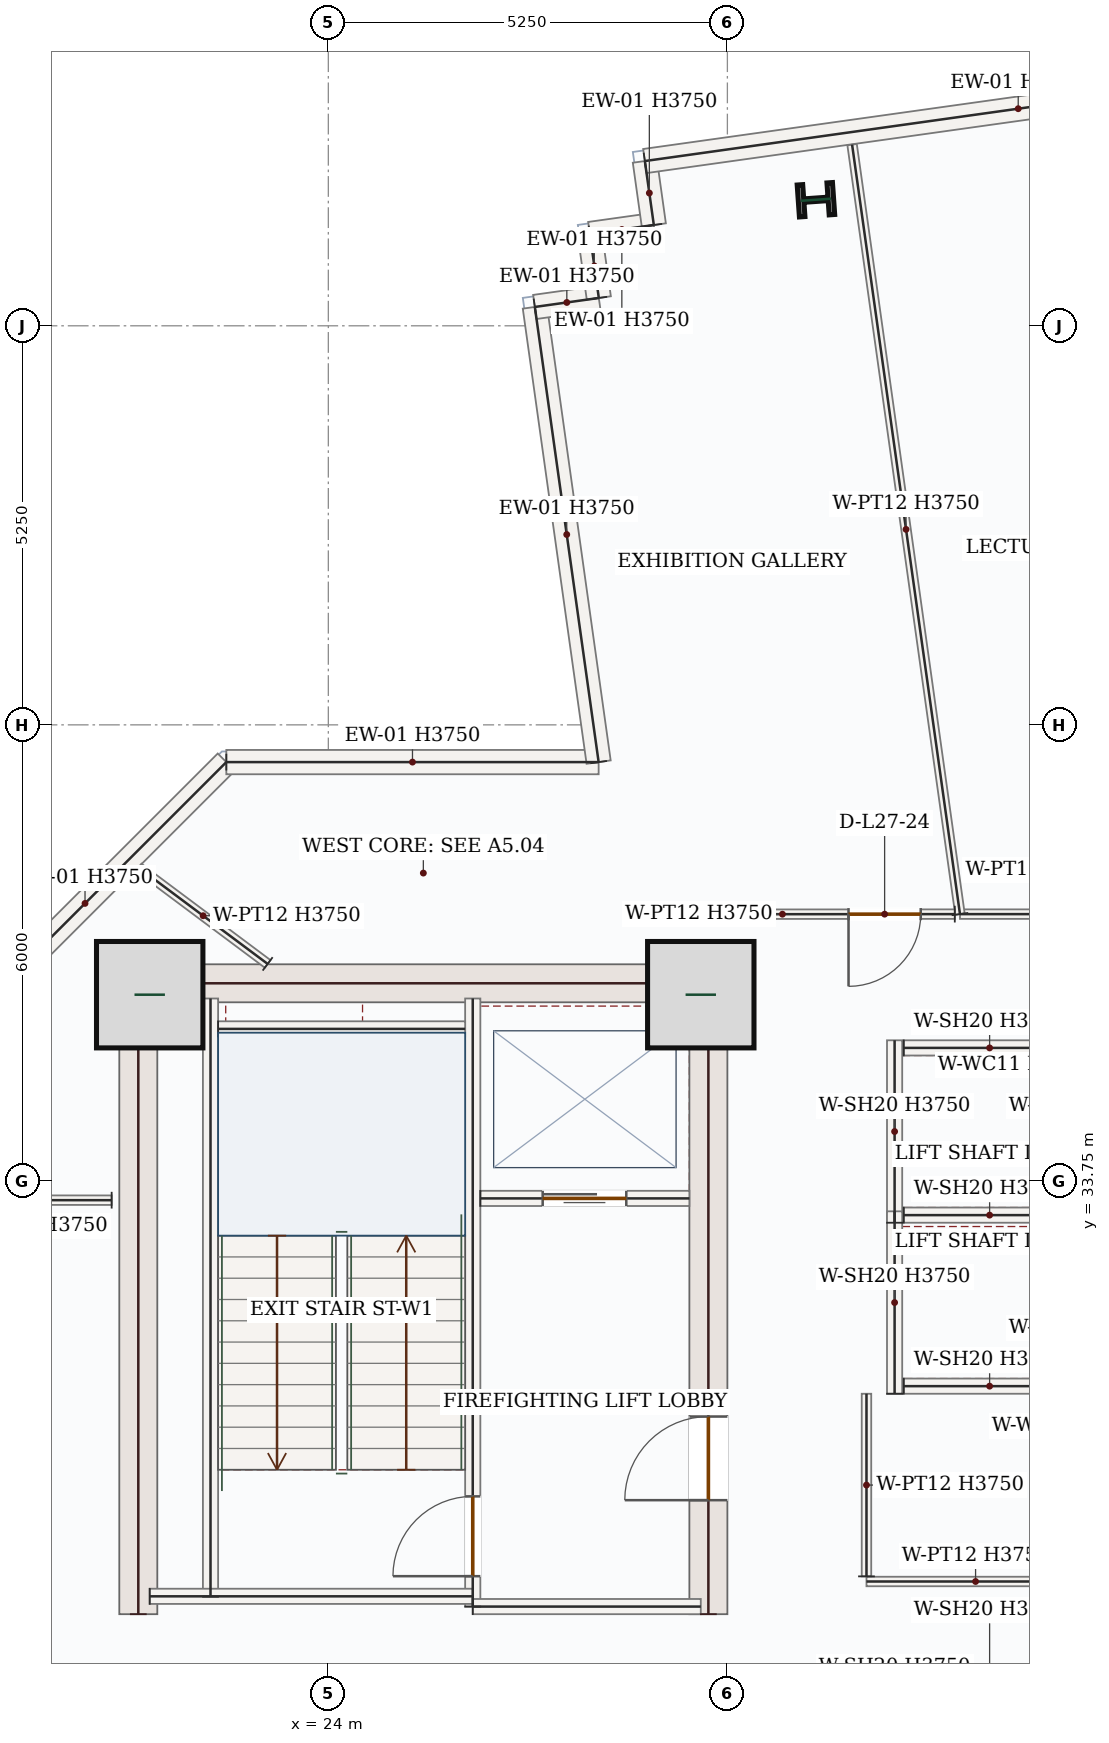
"""IFC4 building model, lengths in metres.
Left out: names, types, materials, properties, quantities, classifications, styles, units other than length and angle.
Written with IfcOpenShell. Run it as: python <this file> out.ifc"""

import sys

from ifc_helpers import new_model, si_unit, direction, frame, frame_2d, origin, origin_2d, place, context, subcontext, project, spatial, rectangle, i_section, extrude, source, transform, mapped, element, fill, save


model = new_model("IFC4")
c1 = context("Model", 3, precision=1e-05, world=origin(), true_north=direction((0.0, 1.0)))
c2 = subcontext(c1, "Body", "Model", "MODEL_VIEW")
j1 = project(units=[si_unit("LENGTHUNIT", "METRE"), si_unit("PLANEANGLEUNIT", "RADIAN")], contexts=[c1])
p1 = place(None, origin())
s1 = spatial("IfcSite", under=j1, at=p1, CompositionType="ELEMENT")
p2 = place(p1, origin())
s2 = spatial("IfcBuilding", under=s1, at=p2, CompositionType="ELEMENT")
p3 = place(p2, frame((0.0, 0.0, 121.5)))
s3 = spatial("IfcBuildingStorey", under=s2, at=p3, CompositionType="ELEMENT", Elevation=121.5)
m1 = source(origin(), c2, "Body", "SweptSolid", [
    extrude(rectangle(XDim=8.55, YDim=0.5, at=frame_2d((4.275, 0.0))), origin(), (0.0, 0.0, 1.0), 3.75),
])
p4 = place(p3, frame((21.5, 28.05, 0.0), z_axis=(0.0, 0.0, 1.0), x_axis=(0.0, 1.0, 0.0)))
e1 = element("IfcWall", 1, at=p4, inside=s3, PredefinedType="SHEAR", context=c2, shape_type="MappedRepresentation", body=[
    mapped(m1, transform((0.0, 0.0, 0.0), x_axis=(1.0, 0.0, 0.0), y_axis=(0.0, 1.0, 0.0), z_axis=(0.0, 0.0, 1.0), scale=1.0)),
])
p5 = place(p3, frame((29.0, 28.05, 0.0), z_axis=(0.0, 0.0, 1.0), x_axis=(0.0, 1.0, 0.0)))
e2 = element("IfcWall", 2, at=p5, inside=s3, PredefinedType="SHEAR", context=c2, shape_type="SweptSolid", body=[
    extrude(rectangle(XDim=8.55, YDim=0.5, at=frame_2d((4.275, 0.0))), origin(), (0.0, 0.0, 1.0), 3.75),
])
p6 = place(p5, frame((1.5, 0.0, 0.0)))
e3 = element("IfcOpeningElement", 3, at=p6, cuts=e2, PredefinedType="OPENING", context=c2, shape_type="SweptSolid", body=[
    extrude(rectangle(XDim=1.1, YDim=2.2, at=frame_2d((0.55, 1.1))), frame((0.0, 0.26, 0.0), z_axis=(0.0, -1.0, 0.0), x_axis=(1.0, 0.0, 0.0)), (0.0, 0.0, 1.0), 0.52),
])
m2 = source(origin(), c2, "Body", "SweptSolid", [
    extrude(rectangle(XDim=7.0, YDim=0.5, at=frame_2d((3.5, 0.0))), origin(), (0.0, 0.0, 1.0), 3.75),
])
p7 = place(p3, frame((21.75, 36.35, 0.0), z_axis=(0.0, 0.0, 1.0), x_axis=(1.0, 0.0, 0.0)))
e4 = element("IfcWall", 4, at=p7, inside=s3, PredefinedType="SHEAR", context=c2, shape_type="MappedRepresentation", body=[
    mapped(m2, transform((0.0, 0.0, 0.0), x_axis=(1.0, 0.0, 0.0), y_axis=(0.0, 1.0, 0.0), z_axis=(0.0, 0.0, 1.0), scale=1.0)),
])
m3 = source(origin(), c2, "Body", "SweptSolid", [
    extrude(rectangle(XDim=1.4, YDim=1.4, at=origin_2d()), origin(), (0.0, 0.0, 1.0), 4.2),
])
for number, where, z_axis, x_axis in (
    (5, (21.65, 36.2, 0.0), (0.0, 0.0, 1.0), (1.0, 0.0, 0.0)),
    (6, (28.9, 36.2, 0.0), (0.0, 0.0, 1.0), (1.0, 0.0, 0.0)),
):
    element("IfcColumn", number, at=place(p3, frame(where, z_axis=z_axis, x_axis=x_axis)), inside=s3, PredefinedType="COLUMN", context=c2, shape_type="MappedRepresentation", body=[
        mapped(m3, transform((0.0, 0.0, 0.0), x_axis=(1.0, 0.0, 0.0), y_axis=(0.0, 1.0, 0.0), z_axis=(0.0, 0.0, 1.0), scale=1.0)),
    ])
m4 = source(origin(), c2, "Body", "SweptSolid", [
    extrude(i_section(OverallWidth=0.421, OverallDepth=0.465, WebThickness=0.045, FlangeThickness=0.073, FilletRadius=0.018, at=origin_2d()), origin(), (0.0, 0.0, 1.0), 4.2),
])
p8 = place(p3, frame((30.415, 46.658, 0.0), z_axis=(0.0, 0.0, 1.0), x_axis=(-0.069756473744, 0.99756405026, 0.0)))
e7 = element("IfcColumn", 7, at=p8, inside=s3, PredefinedType="COLUMN", context=c2, shape_type="MappedRepresentation", body=[
    mapped(m4, transform((0.0, 0.0, 0.0), x_axis=(1.0, 0.0, 0.0), y_axis=(0.0, 1.0, 0.0), z_axis=(0.0, 0.0, 1.0), scale=1.0)),
])
m5 = source(origin(), c2, "Body", "SweptSolid", [
    extrude(rectangle(XDim=5.258, YDim=0.32, at=frame_2d((2.629, 0.0))), origin(), (0.0, 0.0, 1.0), 3.75),
])
p9 = place(p3, frame((18.94, 35.542, 0.0), z_axis=(0.0, 0.0, 1.0), x_axis=(0.707106781187, 0.707106781187, 0.0)))
e8 = element("IfcWall", 8, at=p9, inside=s3, PredefinedType="SOLIDWALL", context=c2, shape_type="MappedRepresentation", body=[
    mapped(m5, transform((0.0, 0.0, 0.0), x_axis=(1.0, 0.0, 0.0), y_axis=(0.0, 1.0, 0.0), z_axis=(0.0, 0.0, 1.0), scale=1.0)),
])
m6 = source(origin(), c2, "Body", "SweptSolid", [
    extrude(rectangle(XDim=4.898, YDim=0.32, at=frame_2d((2.449, 0.0))), origin(), (0.0, 0.0, 1.0), 3.75),
])
p10 = place(p3, frame((22.658, 39.26, 0.0), z_axis=(0.0, 0.0, 1.0), x_axis=(1.0, 0.0, 0.0)))
e9 = element("IfcWall", 9, at=p10, inside=s3, PredefinedType="SOLIDWALL", context=c2, shape_type="MappedRepresentation", body=[
    mapped(m6, transform((0.0, 0.0, 0.0), x_axis=(1.0, 0.0, 0.0), y_axis=(0.0, 1.0, 0.0), z_axis=(0.0, 0.0, 1.0), scale=1.0)),
])
m7 = source(origin(), c2, "Body", "SweptSolid", [
    extrude(rectangle(XDim=6.046, YDim=0.32, at=frame_2d((3.023, 0.0))), origin(), (0.0, 0.0, 1.0), 3.75),
])
p11 = place(p3, frame((27.556, 39.26, 0.0), z_axis=(0.0, 0.0, 1.0), x_axis=(-0.138820507469, 0.990317558517, 0.0)))
e10 = element("IfcWall", 10, at=p11, inside=s3, PredefinedType="SOLIDWALL", context=c2, shape_type="MappedRepresentation", body=[
    mapped(m7, transform((0.0, 0.0, 0.0), x_axis=(1.0, 0.0, 0.0), y_axis=(0.0, 1.0, 0.0), z_axis=(0.0, 0.0, 1.0), scale=1.0)),
])
m8 = source(origin(), c2, "Body", "SweptSolid", [
    extrude(rectangle(XDim=0.85, YDim=0.32, at=frame_2d((0.425, 0.0))), origin(), (0.0, 0.0, 1.0), 3.75),
])
for number, where, z_axis, x_axis in (
    (11, (26.717, 45.248, 0.0), (0.0, 0.0, 1.0), (0.99, 0.139, 0.0)),
    (12, (27.559, 45.366, 0.0), (0.0, 0.0, 1.0), (-0.139, 0.99, 0.0)),
):
    element("IfcWall", number, at=place(p3, frame(where, z_axis=z_axis, x_axis=x_axis)), inside=s3, PredefinedType="SOLIDWALL", context=c2, shape_type="MappedRepresentation", body=[
        mapped(m8, transform((0.0, 0.0, 0.0), x_axis=(1.0, 0.0, 0.0), y_axis=(0.0, 1.0, 0.0), z_axis=(0.0, 0.0, 1.0), scale=1.0)),
    ])
m9 = source(origin(), c2, "Body", "SweptSolid", [
    extrude(rectangle(XDim=0.85, YDim=0.32, at=frame_2d((0.425, 0.0))), origin(), (0.0, 0.0, 1.0), 3.75),
])
p12 = place(p3, frame((27.441, 46.208, 0.0), z_axis=(0.0, 0.0, 1.0), x_axis=(0.990325171071, 0.138766190202, 0.0)))
e13 = element("IfcWall", 13, at=p12, inside=s3, PredefinedType="SOLIDWALL", context=c2, shape_type="MappedRepresentation", body=[
    mapped(m9, transform((0.0, 0.0, 0.0), x_axis=(1.0, 0.0, 0.0), y_axis=(0.0, 1.0, 0.0), z_axis=(0.0, 0.0, 1.0), scale=1.0)),
])
p13 = place(p3, frame((28.282, 46.326, 0.0), z_axis=(0.0, 0.0, 1.0), x_axis=(-0.138726719425, 0.990330700987, 0.0)))
e14 = element("IfcWall", 14, at=p13, inside=s3, PredefinedType="SOLIDWALL", context=c2, shape_type="MappedRepresentation", body=[
    mapped(m8, transform((0.0, 0.0, 0.0), x_axis=(1.0, 0.0, 0.0), y_axis=(0.0, 1.0, 0.0), z_axis=(0.0, 0.0, 1.0), scale=1.0)),
])
m10 = source(origin(), c2, "Body", "SweptSolid", [
    extrude(rectangle(XDim=9.92, YDim=0.32, at=frame_2d((4.96, 0.0))), origin(), (0.0, 0.0, 1.0), 3.75),
])
p14 = place(p3, frame((28.164, 47.167, 0.0), z_axis=(0.0, 0.0, 1.0), x_axis=(0.990316250135, 0.138829840876, 0.0)))
e15 = element("IfcWall", 15, at=p14, inside=s3, PredefinedType="SOLIDWALL", context=c2, shape_type="MappedRepresentation", body=[
    mapped(m10, transform((0.0, 0.0, 0.0), x_axis=(1.0, 0.0, 0.0), y_axis=(0.0, 1.0, 0.0), z_axis=(0.0, 0.0, 1.0), scale=1.0)),
])
m11 = source(origin(), c2, "Body", "SweptSolid", [
    extrude(rectangle(XDim=7.87, YDim=0.2, at=frame_2d((3.935, 0.0))), origin(), (0.0, 0.0, 1.0), 3.75),
])
p15 = place(p3, frame((22.45, 28.28, 0.0), z_axis=(0.0, 0.0, 1.0), x_axis=(0.0, 1.0, 0.0)))
e16 = element("IfcWall", 16, at=p15, inside=s3, PredefinedType="SOLIDWALL", context=c2, shape_type="MappedRepresentation", body=[
    mapped(m11, transform((0.0, 0.0, 0.0), x_axis=(1.0, 0.0, 0.0), y_axis=(0.0, 1.0, 0.0), z_axis=(0.0, 0.0, 1.0), scale=1.0)),
])
p16 = place(p3, frame((25.9, 28.15, 0.0), z_axis=(0.0, 0.0, 1.0), x_axis=(0.0, 1.0, 0.0)))
e17 = element("IfcWall", 17, at=p16, inside=s3, PredefinedType="SOLIDWALL", context=c2, shape_type="SweptSolid", body=[
    extrude(rectangle(XDim=8.0, YDim=0.2, at=frame_2d((4.0, 0.0))), origin(), (0.0, 0.0, 1.0), 3.75),
])
p17 = place(p16, frame((0.4, 0.0, 0.0)))
e18 = element("IfcOpeningElement", 18, at=p17, cuts=e17, PredefinedType="OPENING", context=c2, shape_type="SweptSolid", body=[
    extrude(rectangle(XDim=1.05, YDim=2.15, at=frame_2d((0.525, 1.075))), frame((0.0, 0.11, 0.0), z_axis=(0.0, -1.0, 0.0), x_axis=(1.0, 0.0, 0.0)), (0.0, 0.0, 1.0), 0.22),
])
m12 = source(origin(), c2, "Body", "SweptSolid", [
    extrude(rectangle(XDim=4.25, YDim=0.2, at=frame_2d((2.125, 0.0))), origin(), (0.0, 0.0, 1.0), 3.75),
])
p18 = place(p3, frame((21.65, 28.285, 0.0), z_axis=(0.0, 0.0, 1.0), x_axis=(1.0, 0.0, 0.0)))
e19 = element("IfcWall", 19, at=p18, inside=s3, PredefinedType="SOLIDWALL", context=c2, shape_type="MappedRepresentation", body=[
    mapped(m12, transform((0.0, 0.0, 0.0), x_axis=(1.0, 0.0, 0.0), y_axis=(0.0, 1.0, 0.0), z_axis=(0.0, 0.0, 1.0), scale=1.0)),
])
m13 = source(origin(), c2, "Body", "SweptSolid", [
    extrude(rectangle(XDim=3.0, YDim=0.2, at=frame_2d((1.5, 0.0))), origin(), (0.0, 0.0, 1.0), 3.75),
])
p19 = place(p3, frame((25.9, 28.15, 0.0), z_axis=(0.0, 0.0, 1.0), x_axis=(1.0, 0.0, 0.0)))
e20 = element("IfcWall", 20, at=p19, inside=s3, PredefinedType="SOLIDWALL", context=c2, shape_type="MappedRepresentation", body=[
    mapped(m13, transform((0.0, 0.0, 0.0), x_axis=(1.0, 0.0, 0.0), y_axis=(0.0, 1.0, 0.0), z_axis=(0.0, 0.0, 1.0), scale=1.0)),
])
m14 = source(origin(), c2, "Body", "SweptSolid", [
    extrude(rectangle(XDim=3.25, YDim=0.2, at=frame_2d((1.625, 0.0))), origin(), (0.0, 0.0, 1.0), 3.75),
])
p20 = place(p3, frame((22.55, 35.75, 0.0), z_axis=(0.0, 0.0, 1.0), x_axis=(1.0, 0.0, 0.0)))
e21 = element("IfcWall", 21, at=p20, inside=s3, PredefinedType="SOLIDWALL", context=c2, shape_type="MappedRepresentation", body=[
    mapped(m14, transform((0.0, 0.0, 0.0), x_axis=(1.0, 0.0, 0.0), y_axis=(0.0, 1.0, 0.0), z_axis=(0.0, 0.0, 1.0), scale=1.0)),
])
p21 = place(p3, frame((26.0, 33.52, 0.0), z_axis=(0.0, 0.0, 1.0), x_axis=(1.0, 0.0, 0.0)))
e22 = element("IfcWall", 22, at=p21, inside=s3, PredefinedType="SOLIDWALL", context=c2, shape_type="SweptSolid", body=[
    extrude(rectangle(XDim=2.75, YDim=0.2, at=frame_2d((1.375, 0.0))), origin(), (0.0, 0.0, 1.0), 3.75),
])
p22 = place(p21, frame((0.82, 0.0, 0.0)))
e23 = element("IfcOpeningElement", 23, at=p22, cuts=e22, PredefinedType="OPENING", context=c2, shape_type="SweptSolid", body=[
    extrude(rectangle(XDim=1.1, YDim=2.15, at=frame_2d((0.55, 1.075))), frame((0.0, 0.11, 0.0), z_axis=(0.0, -1.0, 0.0), x_axis=(1.0, 0.0, 0.0)), (0.0, 0.0, 1.0), 0.22),
])
m15 = source(origin(), c2, "Body", "SweptSolid", [
    extrude(rectangle(XDim=2.4, YDim=0.2, at=frame_2d((1.2, 0.0))), origin(), (0.0, 0.0, 1.0), 3.75),
])
p23 = place(p3, frame((31.45, 33.2, 0.0), z_axis=(0.0, 0.0, 1.0), x_axis=(0.0, 1.0, 0.0)))
e24 = element("IfcWall", 24, at=p23, inside=s3, PredefinedType="SOLIDWALL", context=c2, shape_type="MappedRepresentation", body=[
    mapped(m15, transform((0.0, 0.0, 0.0), x_axis=(1.0, 0.0, 0.0), y_axis=(0.0, 1.0, 0.0), z_axis=(0.0, 0.0, 1.0), scale=1.0)),
])
m16 = source(origin(), c2, "Body", "SweptSolid", [
    extrude(rectangle(XDim=2.26, YDim=0.2, at=frame_2d((1.13, 0.0))), origin(), (0.0, 0.0, 1.0), 3.75),
])
for number, where, z_axis, x_axis in (
    (25, (31.57, 33.3, 0.0), (0.0, 0.0, 1.0), (1.0, 0.0, 0.0)),
    (26, (31.57, 35.5, 0.0), (0.0, 0.0, 1.0), (1.0, 0.0, 0.0)),
):
    element("IfcWall", number, at=place(p3, frame(where, z_axis=z_axis, x_axis=x_axis)), inside=s3, PredefinedType="SOLIDWALL", context=c2, shape_type="MappedRepresentation", body=[
        mapped(m16, transform((0.0, 0.0, 0.0), x_axis=(1.0, 0.0, 0.0), y_axis=(0.0, 1.0, 0.0), z_axis=(0.0, 0.0, 1.0), scale=1.0)),
    ])
p24 = place(p3, frame((31.45, 30.95, 0.0), z_axis=(0.0, 0.0, 1.0), x_axis=(0.0, 1.0, 0.0)))
e27 = element("IfcWall", 27, at=p24, inside=s3, PredefinedType="SOLIDWALL", context=c2, shape_type="MappedRepresentation", body=[
    mapped(m15, transform((0.0, 0.0, 0.0), x_axis=(1.0, 0.0, 0.0), y_axis=(0.0, 1.0, 0.0), z_axis=(0.0, 0.0, 1.0), scale=1.0)),
])
p25 = place(p3, frame((31.57, 31.05, 0.0), z_axis=(0.0, 0.0, 1.0), x_axis=(1.0, 0.0, 0.0)))
e28 = element("IfcWall", 28, at=p25, inside=s3, PredefinedType="SOLIDWALL", context=c2, shape_type="MappedRepresentation", body=[
    mapped(m16, transform((0.0, 0.0, 0.0), x_axis=(1.0, 0.0, 0.0), y_axis=(0.0, 1.0, 0.0), z_axis=(0.0, 0.0, 1.0), scale=1.0)),
])
p26 = place(p3, frame((35.903, 28.48, 0.0), z_axis=(0.0, 0.0, 1.0), x_axis=(-1.0, 0.0, 0.0)))
e29 = element("IfcWall", 29, at=p26, inside=s3, PredefinedType="PARTITIONING", context=c2, shape_type="SweptSolid", body=[
    extrude(rectangle(XDim=4.823, YDim=0.125, at=frame_2d((2.411, 0.0))), origin(), (0.0, 0.0, 1.0), 3.75),
])
p27 = place(p26, frame((0.852, 0.0, 0.0)))
e30 = element("IfcOpeningElement", 30, at=p27, cuts=e29, PredefinedType="OPENING", context=c2, shape_type="SweptSolid", body=[
    extrude(rectangle(XDim=0.95, YDim=2.15, at=frame_2d((0.475, 1.075))), frame((0.0, 0.073, 0.0), z_axis=(0.0, -1.0, 0.0), x_axis=(1.0, 0.0, 0.0)), (0.0, 0.0, 1.0), 0.145),
])
m17 = source(origin(), c2, "Body", "SweptSolid", [
    extrude(rectangle(XDim=2.402, YDim=0.125, at=frame_2d((1.201, 0.0))), origin(), (0.0, 0.0, 1.0), 3.75),
])
p28 = place(p3, frame((31.08, 28.548, 0.0), z_axis=(0.0, 0.0, 1.0), x_axis=(0.0, 1.0, 0.0)))
e31 = element("IfcWall", 31, at=p28, inside=s3, PredefinedType="PARTITIONING", context=c2, shape_type="MappedRepresentation", body=[
    mapped(m17, transform((0.0, 0.0, 0.0), x_axis=(1.0, 0.0, 0.0), y_axis=(0.0, 1.0, 0.0), z_axis=(0.0, 0.0, 1.0), scale=1.0)),
])
p29 = place(p3, frame((36.119, 37.26, 0.0), z_axis=(0.0, 0.0, 1.0), x_axis=(-1.0, 0.0, 0.0)))
e32 = element("IfcWall", 32, at=p29, inside=s3, PredefinedType="PARTITIONING", context=c2, shape_type="SweptSolid", body=[
    extrude(rectangle(XDim=3.809, YDim=0.125, at=frame_2d((1.905, 0.0))), origin(), (0.0, 0.0, 1.0), 3.75),
])
p30 = place(p29, frame((0.629, 0.0, 0.0)))
e33 = element("IfcOpeningElement", 33, at=p30, cuts=e32, PredefinedType="OPENING", context=c2, shape_type="SweptSolid", body=[
    extrude(rectangle(XDim=0.95, YDim=2.15, at=frame_2d((0.475, 1.075))), frame((0.0, 0.073, 0.0), z_axis=(0.0, -1.0, 0.0), x_axis=(1.0, 0.0, 0.0)), (0.0, 0.0, 1.0), 0.145),
])
m18 = source(origin(), c2, "Body", "SweptSolid", [
    extrude(rectangle(XDim=10.222, YDim=0.125, at=frame_2d((5.111, 0.0))), origin(), (0.0, 0.0, 1.0), 3.75),
])
p31 = place(p3, frame((32.31, 37.26, 0.0), z_axis=(0.0, 0.0, 1.0), x_axis=(-0.138816035819, 0.990318185332, 0.0)))
e34 = element("IfcWall", 34, at=p31, inside=s3, PredefinedType="PARTITIONING", context=c2, shape_type="MappedRepresentation", body=[
    mapped(m18, transform((0.0, 0.0, 0.0), x_axis=(1.0, 0.0, 0.0), y_axis=(0.0, 1.0, 0.0), z_axis=(0.0, 0.0, 1.0), scale=1.0)),
])
p32 = place(p3, frame((32.242, 37.26, 0.0), z_axis=(0.0, 0.0, 1.0), x_axis=(-0.999999916483, -0.00040869704, 0.0)))
e35 = element("IfcWall", 35, at=p32, inside=s3, PredefinedType="PARTITIONING", context=c2, shape_type="SweptSolid", body=[
    extrude(rectangle(XDim=2.987, YDim=0.125, at=frame_2d((1.493, 0.0))), origin(), (0.0, 0.0, 1.0), 3.75),
])
p33 = place(p32, frame((0.448, 0.0, 0.0)))
e36 = element("IfcOpeningElement", 36, at=p33, cuts=e35, PredefinedType="OPENING", context=c2, shape_type="SweptSolid", body=[
    extrude(rectangle(XDim=0.95, YDim=2.15, at=frame_2d((0.475, 1.075))), frame((0.0, 0.073, 0.0), z_axis=(0.0, -1.0, 0.0), x_axis=(1.0, 0.0, 0.0)), (0.0, 0.0, 1.0), 0.145),
])
m19 = source(origin(), c2, "Body", "SweptSolid", [
    extrude(rectangle(XDim=2.119, YDim=0.125, at=frame_2d((1.059, 0.0))), origin(), (0.0, 0.0, 1.0), 3.75),
])
p34 = place(p3, frame((23.202, 36.605, 0.0), z_axis=(0.0, 0.0, 1.0), x_axis=(-0.801201403988, 0.598394777925, 0.0)))
e37 = element("IfcWall", 37, at=p34, inside=s3, PredefinedType="PARTITIONING", context=c2, shape_type="MappedRepresentation", body=[
    mapped(m19, transform((0.0, 0.0, 0.0), x_axis=(1.0, 0.0, 0.0), y_axis=(0.0, 1.0, 0.0), z_axis=(0.0, 0.0, 1.0), scale=1.0)),
])
m20 = source(origin(), c2, "Body", "SweptSolid", [
    extrude(rectangle(XDim=2.049, YDim=0.125, at=frame_2d((1.025, 0.0))), origin(), (0.0, 0.0, 1.0), 3.75),
])
p35 = place(p3, frame((21.149, 33.497, 0.0), z_axis=(0.0, 0.0, 1.0), x_axis=(-0.999999936133, 0.000357398119, 0.0)))
e38 = element("IfcWall", 38, at=p35, inside=s3, PredefinedType="PARTITIONING", context=c2, shape_type="MappedRepresentation", body=[
    mapped(m20, transform((0.0, 0.0, 0.0), x_axis=(1.0, 0.0, 0.0), y_axis=(0.0, 1.0, 0.0), z_axis=(0.0, 0.0, 1.0), scale=1.0)),
])
m21 = source(origin(), c2, "Body", "SweptSolid", [
    extrude(rectangle(XDim=1.05, YDim=2.15, at=frame_2d((0.525, 1.075))), frame((0.0, 0.025, 0.0), z_axis=(0.0, -1.0, 0.0), x_axis=(1.0, 0.0, 0.0)), (0.0, 0.0, 1.0), 0.05),
])
p36 = place(p17, origin())
e39 = element("IfcDoor", 39, at=p36, inside=s3, OperationType="SINGLE_SWING_LEFT", PredefinedType="DOOR", context=c2, shape_type="MappedRepresentation", body=[
    mapped(m21, transform((0.0, 0.0, 0.0), x_axis=(1.0, 0.0, 0.0), y_axis=(0.0, 1.0, 0.0), z_axis=(0.0, 0.0, 1.0), scale=1.0)),
])
fill(e18, e39)
m22 = source(origin(), c2, "Body", "SweptSolid", [
    extrude(rectangle(XDim=1.1, YDim=2.15, at=frame_2d((0.55, 1.075))), frame((0.0, 0.025, 0.0), z_axis=(0.0, -1.0, 0.0), x_axis=(1.0, 0.0, 0.0)), (0.0, 0.0, 1.0), 0.05),
])
p37 = place(p22, origin())
e40 = element("IfcDoor", 40, at=p37, inside=s3, OperationType="DOUBLE_DOOR_SLIDING", PredefinedType="DOOR", context=c2, shape_type="MappedRepresentation", body=[
    mapped(m22, transform((0.0, 0.0, 0.0), x_axis=(1.0, 0.0, 0.0), y_axis=(0.0, 1.0, 0.0), z_axis=(0.0, 0.0, 1.0), scale=1.0)),
])
fill(e23, e40)
m23 = source(origin(), c2, "Body", "SweptSolid", [
    extrude(rectangle(XDim=1.1, YDim=2.2, at=frame_2d((0.55, 1.1))), frame((0.0, 0.025, 0.0), z_axis=(0.0, -1.0, 0.0), x_axis=(1.0, 0.0, 0.0)), (0.0, 0.0, 1.0), 0.05),
])
p38 = place(p6, origin())
e41 = element("IfcDoor", 41, at=p38, inside=s3, OperationType="SINGLE_SWING_LEFT", PredefinedType="DOOR", context=c2, shape_type="MappedRepresentation", body=[
    mapped(m23, transform((0.0, 0.0, 0.0), x_axis=(1.0, 0.0, 0.0), y_axis=(0.0, 1.0, 0.0), z_axis=(0.0, 0.0, 1.0), scale=1.0)),
])
fill(e3, e41)
m24 = source(origin(), c2, "Body", "SweptSolid", [
    extrude(rectangle(XDim=0.95, YDim=2.15, at=frame_2d((0.475, 1.075))), frame((0.0, 0.025, 0.0), z_axis=(0.0, -1.0, 0.0), x_axis=(1.0, 0.0, 0.0)), (0.0, 0.0, 1.0), 0.05),
])
p39 = place(p33, origin())
e42 = element("IfcDoor", 42, at=p39, inside=s3, OperationType="SINGLE_SWING_RIGHT", PredefinedType="DOOR", context=c2, shape_type="MappedRepresentation", body=[
    mapped(m24, transform((0.0, 0.0, 0.0), x_axis=(1.0, 0.0, 0.0), y_axis=(0.0, 1.0, 0.0), z_axis=(0.0, 0.0, 1.0), scale=1.0)),
])
fill(e36, e42)
save(model, sys.argv[1])
